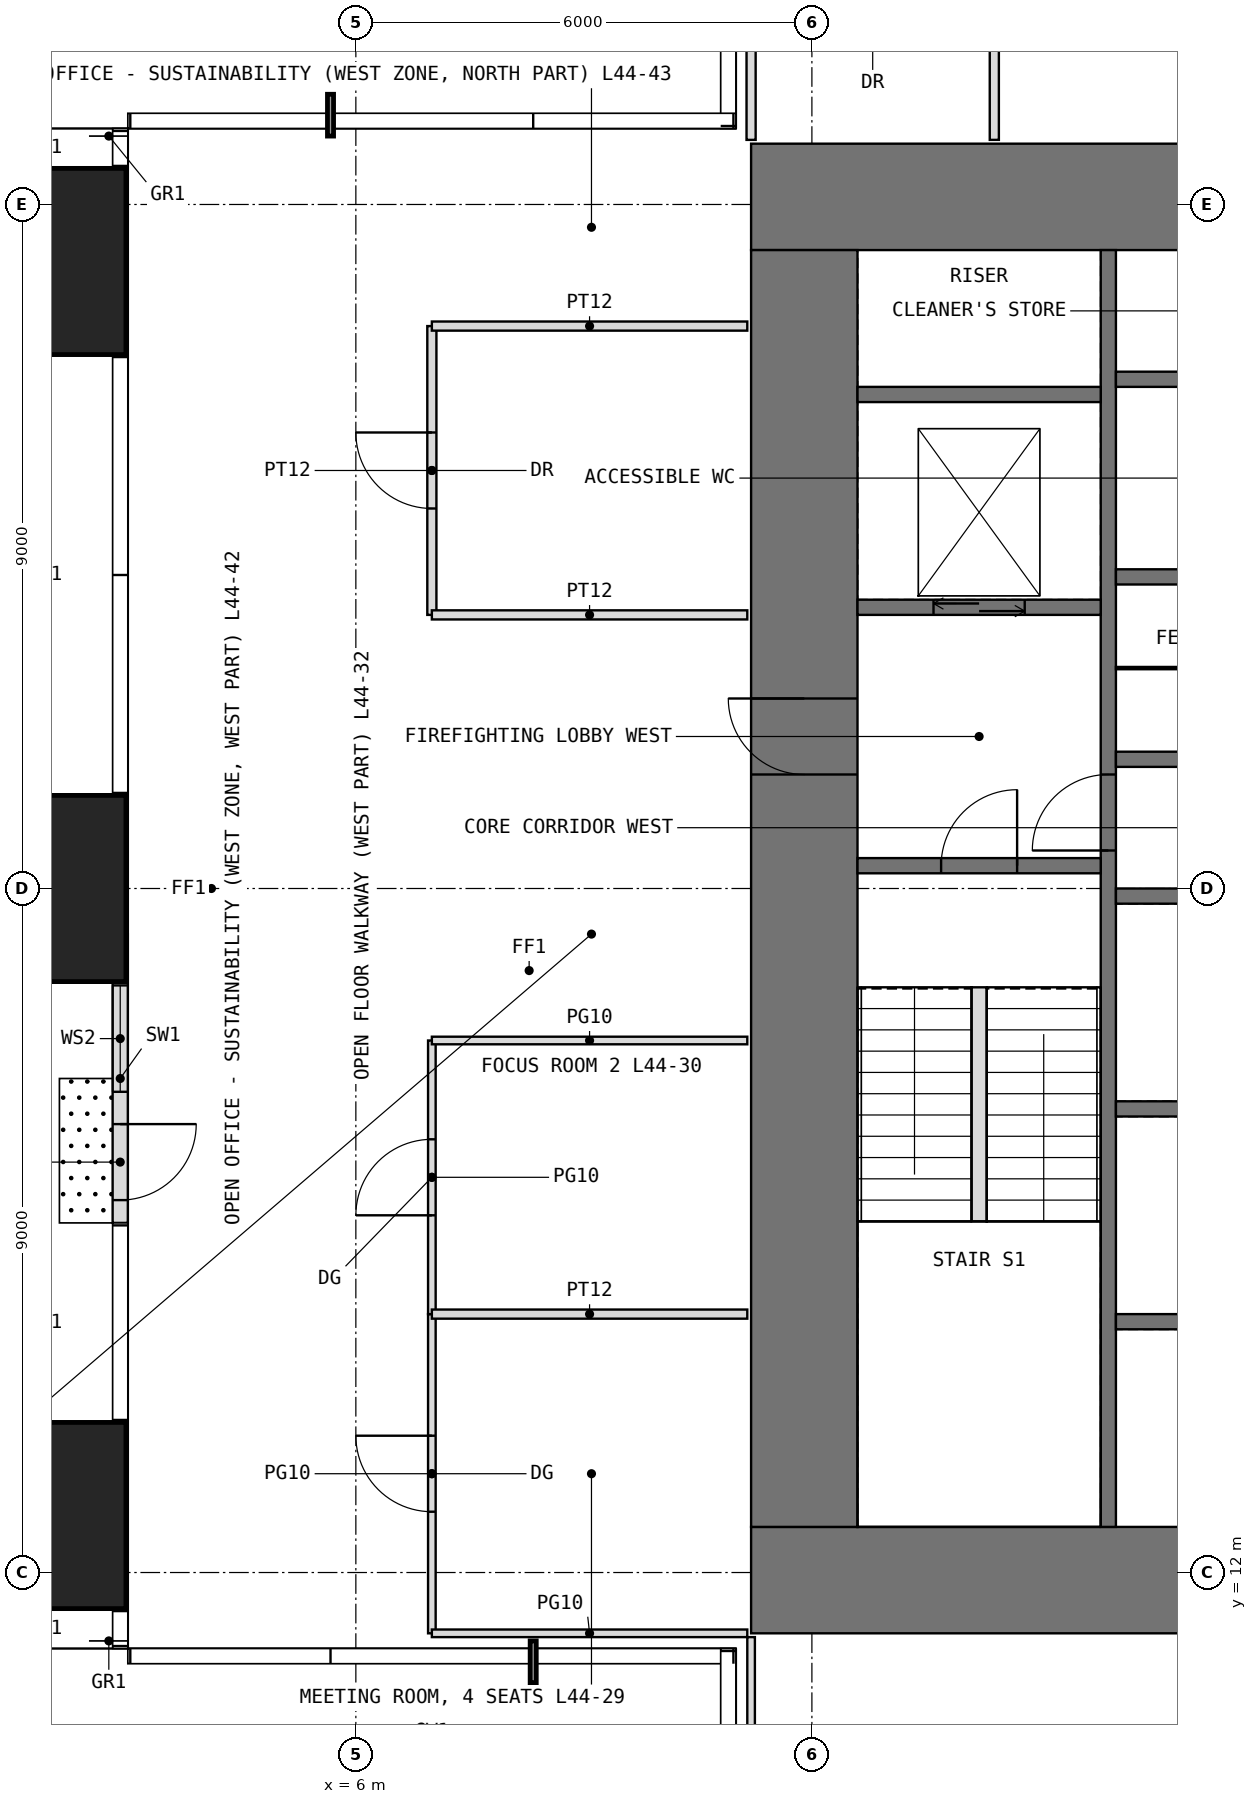
"""IFC4 building model, lengths in metres.
Left out: names, types, materials, properties, quantities, classifications, styles, units other than length and angle.
Written with IfcOpenShell. Run it as: python <this file> out.ifc"""

import sys

from ifc_helpers import new_model, si_unit, direction, frame, frame_2d, origin, origin_2d, place, context, subcontext, project, spatial, rectangle, extrude, element, fill, save


model = new_model("IFC4")
c1 = context("Model", 3, precision=1e-05, world=origin(), true_north=direction((0.0, 1.0)))
c2 = subcontext(c1, "Body", "Model", "MODEL_VIEW")
j1 = project(units=[si_unit("LENGTHUNIT", "METRE"), si_unit("PLANEANGLEUNIT", "RADIAN")], contexts=[c1])
p1 = place(None, origin())
s1 = spatial("IfcSite", under=j1, at=p1, CompositionType="ELEMENT")
p2 = place(p1, origin())
s2 = spatial("IfcBuilding", under=s1, at=p2, CompositionType="ELEMENT")
p3 = place(p2, frame((0.0, 0.0, 186.5)))
s3 = spatial("IfcBuildingStorey", under=s2, at=p3, CompositionType="ELEMENT", Elevation=186.5)
for number, where, z_axis, x_axis in (
    (1, (1.75, 12.75, 0.0), (0.0, 0.0, 1.0), (1.0, 0.0, 0.0)),
    (2, (1.75, 21.0, 0.0), (0.0, 0.0, 1.0), (1.0, 0.0, 0.0)),
    (3, (1.75, 29.25, 0.0), (0.0, 0.0, 1.0), (1.0, 0.0, 0.0)),
):
    element("IfcColumn", number, at=place(p3, frame(where, z_axis=z_axis, x_axis=x_axis)), inside=s3, PredefinedType="COLUMN", context=c2, shape_type="SweptSolid", body=[
        extrude(rectangle(XDim=2.45, YDim=2.45, at=origin_2d()), origin(), (0.0, 0.0, 1.0), 4.0),
    ])
p4 = place(p3, frame((2.9, 20.4, 0.0), z_axis=(0.0, 0.0, 1.0), x_axis=(0.0, -1.0, 0.0)))
e4 = element("IfcWall", 4, at=p4, inside=s3, PredefinedType="USERDEFINED", context=c2, shape_type="SweptSolid", body=[
    extrude(rectangle(XDim=3.8, YDim=0.2, at=frame_2d((1.9, 0.0))), origin(), (0.0, 0.0, 1.0), 3.75),
])
p5 = place(p4, frame((2.5, 0.0, 0.0)))
e5 = element("IfcOpeningElement", 5, at=p5, cuts=e4, PredefinedType="OPENING", context=c2, shape_type="SweptSolid", body=[
    extrude(rectangle(XDim=1.0, YDim=2.4, at=frame_2d((0.5, 1.2))), frame((0.0, 0.11, 0.0), z_axis=(0.0, -1.0, 0.0), x_axis=(1.0, 0.0, 0.0)), (0.0, 0.0, 1.0), 0.22),
])
p6 = place(p4, frame((0.675, 0.0, 0.3)))
e6 = element("IfcOpeningElement", 6, at=p6, cuts=e4, PredefinedType="OPENING", context=c2, shape_type="SweptSolid", body=[
    extrude(rectangle(XDim=1.4, YDim=2.7, at=frame_2d((0.7, 1.35))), frame((0.0, 0.11, 0.0), z_axis=(0.0, -1.0, 0.0), x_axis=(1.0, 0.0, 0.0)), (0.0, 0.0, 1.0), 0.22),
])
p7 = place(p3, frame((11.2, 11.9, -0.05), z_axis=(0.0, 0.0, 1.0), x_axis=(1.0, 0.0, 0.0)))
e7 = element("IfcWall", 7, at=p7, inside=s3, PredefinedType="SHEAR", context=c2, shape_type="SweptSolid", body=[
    extrude(rectangle(XDim=19.6, YDim=1.4, at=frame_2d((9.8, 0.0))), origin(), (0.0, 0.0, 1.0), 4.0),
])
p8 = place(p7, frame((8.8, 0.0, 0.05)))
e8 = element("IfcOpeningElement", 8, at=p8, cuts=e7, PredefinedType="OPENING", context=c2, shape_type="SweptSolid", body=[
    extrude(rectangle(XDim=2.0, YDim=2.2, at=frame_2d((1.0, 1.1))), frame((0.0, 0.71, 0.0), z_axis=(0.0, -1.0, 0.0), x_axis=(1.0, 0.0, 0.0)), (0.0, 0.0, 1.0), 1.42),
])
p9 = place(p3, frame((11.2, 30.1, -0.05), z_axis=(0.0, 0.0, 1.0), x_axis=(1.0, 0.0, 0.0)))
e9 = element("IfcWall", 9, at=p9, inside=s3, PredefinedType="SHEAR", context=c2, shape_type="SweptSolid", body=[
    extrude(rectangle(XDim=19.6, YDim=1.4, at=frame_2d((9.8, 0.0))), origin(), (0.0, 0.0, 1.0), 4.0),
])
p10 = place(p9, frame((8.8, 0.0, 0.05)))
e10 = element("IfcOpeningElement", 10, at=p10, cuts=e9, PredefinedType="OPENING", context=c2, shape_type="SweptSolid", body=[
    extrude(rectangle(XDim=2.0, YDim=2.2, at=frame_2d((1.0, 1.1))), frame((0.0, 0.71, 0.0), z_axis=(0.0, -1.0, 0.0), x_axis=(1.0, 0.0, 0.0)), (0.0, 0.0, 1.0), 1.42),
])
p11 = place(p3, frame((11.9, 12.6, -0.05), z_axis=(0.0, 0.0, 1.0), x_axis=(0.0, 1.0, 0.0)))
e11 = element("IfcWall", 11, at=p11, inside=s3, PredefinedType="SHEAR", context=c2, shape_type="SweptSolid", body=[
    extrude(rectangle(XDim=16.8, YDim=1.4, at=frame_2d((8.4, 0.0))), origin(), (0.0, 0.0, 1.0), 4.0),
])
p12 = place(p11, frame((9.9, 0.0, 0.05)))
e12 = element("IfcOpeningElement", 12, at=p12, cuts=e11, PredefinedType="OPENING", context=c2, shape_type="SweptSolid", body=[
    extrude(rectangle(XDim=1.0, YDim=2.2, at=frame_2d((0.5, 1.1))), frame((0.0, 0.71, 0.0), z_axis=(0.0, -1.0, 0.0), x_axis=(1.0, 0.0, 0.0)), (0.0, 0.0, 1.0), 1.42),
])
p13 = place(p3, frame((15.9, 12.6, -0.05), z_axis=(0.0, 0.0, 1.0), x_axis=(0.0, 1.0, 0.0)))
e13 = element("IfcWall", 13, at=p13, inside=s3, PredefinedType="SHEAR", context=c2, shape_type="SweptSolid", body=[
    extrude(rectangle(XDim=16.8, YDim=0.2, at=frame_2d((8.4, 0.0))), origin(), (0.0, 0.0, 1.0), 4.0),
])
p14 = place(p13, frame((8.9, 0.0, 0.05)))
e14 = element("IfcOpeningElement", 14, at=p14, cuts=e13, PredefinedType="OPENING", context=c2, shape_type="SweptSolid", body=[
    extrude(rectangle(XDim=1.0, YDim=2.2, at=frame_2d((0.5, 1.1))), frame((0.0, 0.11, 0.0), z_axis=(0.0, -1.0, 0.0), x_axis=(1.0, 0.0, 0.0)), (0.0, 0.0, 1.0), 0.22),
])
p15 = place(p3, frame((12.6, 21.3, -0.05), z_axis=(0.0, 0.0, 1.0), x_axis=(1.0, 0.0, 0.0)))
e15 = element("IfcWall", 15, at=p15, inside=s3, PredefinedType="SHEAR", context=c2, shape_type="SweptSolid", body=[
    extrude(rectangle(XDim=3.2, YDim=0.2, at=frame_2d((1.6, 0.0))), origin(), (0.0, 0.0, 1.0), 4.0),
])
p16 = place(p15, frame((1.1, 0.0, 0.05)))
e16 = element("IfcOpeningElement", 16, at=p16, cuts=e15, PredefinedType="OPENING", context=c2, shape_type="SweptSolid", body=[
    extrude(rectangle(XDim=1.0, YDim=2.2, at=frame_2d((0.5, 1.1))), frame((0.0, 0.11, 0.0), z_axis=(0.0, -1.0, 0.0), x_axis=(1.0, 0.0, 0.0)), (0.0, 0.0, 1.0), 0.22),
])
p17 = place(p3, frame((12.6, 24.7, -0.05), z_axis=(0.0, 0.0, 1.0), x_axis=(1.0, 0.0, 0.0)))
e17 = element("IfcWall", 17, at=p17, inside=s3, PredefinedType="SHEAR", context=c2, shape_type="SweptSolid", body=[
    extrude(rectangle(XDim=3.2, YDim=0.2, at=frame_2d((1.6, 0.0))), origin(), (0.0, 0.0, 1.0), 4.0),
])
p18 = place(p17, frame((1.0, 0.0, 0.05)))
e18 = element("IfcOpeningElement", 18, at=p18, cuts=e17, PredefinedType="OPENING", context=c2, shape_type="SweptSolid", body=[
    extrude(rectangle(XDim=1.2, YDim=2.2, at=frame_2d((0.6, 1.1))), frame((0.0, 0.11, 0.0), z_axis=(0.0, -1.0, 0.0), x_axis=(1.0, 0.0, 0.0)), (0.0, 0.0, 1.0), 0.22),
])
for number, where, z_axis, x_axis in (
    (19, (12.6, 27.5, -0.05), (0.0, 0.0, 1.0), (1.0, 0.0, 0.0)),
    (20, (16.0, 15.3, -0.05), (0.0, 0.0, 1.0), (1.0, 0.0, 0.0)),
    (21, (16.0, 18.1, -0.05), (0.0, 0.0, 1.0), (1.0, 0.0, 0.0)),
    (22, (16.0, 20.9, -0.05), (0.0, 0.0, 1.0), (1.0, 0.0, 0.0)),
    (23, (16.0, 22.7, -0.05), (0.0, 0.0, 1.0), (1.0, 0.0, 0.0)),
    (24, (16.0, 25.1, -0.05), (0.0, 0.0, 1.0), (1.0, 0.0, 0.0)),
    (25, (16.0, 27.7, -0.05), (0.0, 0.0, 1.0), (1.0, 0.0, 0.0)),
):
    element("IfcWall", number, at=place(p3, frame(where, z_axis=z_axis, x_axis=x_axis)), inside=s3, PredefinedType="SHEAR", context=c2, shape_type="SweptSolid", body=[
        extrude(rectangle(XDim=3.2, YDim=0.2, at=frame_2d((1.6, 0.0))), origin(), (0.0, 0.0, 1.0), 4.0),
    ])
p19 = place(p3, frame((16.0, 23.9, 0.0), z_axis=(0.0, 0.0, 1.0), x_axis=(1.0, 0.0, 0.0)))
e26 = element("IfcWall", 26, at=p19, inside=s3, PredefinedType="PARTITIONING", context=c2, shape_type="SweptSolid", body=[
    extrude(rectangle(XDim=1.4, YDim=0.03, at=frame_2d((0.7, 0.0))), origin(), (0.0, 0.0, 1.0), 3.75),
])
p20 = place(p3, frame((7.0, 11.2, 0.0), z_axis=(0.0, 0.0, 1.0), x_axis=(0.0, 1.0, 0.0)))
e27 = element("IfcWall", 27, at=p20, inside=s3, PredefinedType="PARTITIONING", context=c2, shape_type="SweptSolid", body=[
    extrude(rectangle(XDim=4.2, YDim=0.1, at=frame_2d((2.1, 0.0))), origin(), (0.0, 0.0, 1.0), 3.75),
])
p21 = place(p20, frame((1.6, 0.0, 0.0)))
e28 = element("IfcOpeningElement", 28, at=p21, cuts=e27, PredefinedType="OPENING", context=c2, shape_type="SweptSolid", body=[
    extrude(rectangle(XDim=1.0, YDim=2.4, at=frame_2d((0.5, 1.2))), frame((0.0, 0.06, 0.0), z_axis=(0.0, -1.0, 0.0), x_axis=(1.0, 0.0, 0.0)), (0.0, 0.0, 1.0), 0.12),
])
p22 = place(p3, frame((7.0, 11.2, 0.0), z_axis=(0.0, 0.0, 1.0), x_axis=(1.0, 0.0, 0.0)))
e29 = element("IfcWall", 29, at=p22, inside=s3, PredefinedType="PARTITIONING", context=c2, shape_type="SweptSolid", body=[
    extrude(rectangle(XDim=4.15, YDim=0.1, at=frame_2d((2.075, 0.0))), origin(), (0.0, 0.0, 1.0), 3.75),
])
p23 = place(p3, frame((7.0, 15.4, 0.0), z_axis=(0.0, 0.0, 1.0), x_axis=(0.0, 1.0, 0.0)))
e30 = element("IfcWall", 30, at=p23, inside=s3, PredefinedType="PARTITIONING", context=c2, shape_type="SweptSolid", body=[
    extrude(rectangle(XDim=3.6, YDim=0.1, at=frame_2d((1.8, 0.0))), origin(), (0.0, 0.0, 1.0), 3.75),
])
p24 = place(p23, frame((1.3, 0.0, 0.0)))
e31 = element("IfcOpeningElement", 31, at=p24, cuts=e30, PredefinedType="OPENING", context=c2, shape_type="SweptSolid", body=[
    extrude(rectangle(XDim=1.0, YDim=2.4, at=frame_2d((0.5, 1.2))), frame((0.0, 0.06, 0.0), z_axis=(0.0, -1.0, 0.0), x_axis=(1.0, 0.0, 0.0)), (0.0, 0.0, 1.0), 0.12),
])
p25 = place(p3, frame((7.0, 15.4, 0.0), z_axis=(0.0, 0.0, 1.0), x_axis=(1.0, 0.0, 0.0)))
e32 = element("IfcWall", 32, at=p25, inside=s3, PredefinedType="PARTITIONING", context=c2, shape_type="SweptSolid", body=[
    extrude(rectangle(XDim=4.15, YDim=0.12, at=frame_2d((2.075, 0.0))), origin(), (0.0, 0.0, 1.0), 3.75),
])
p26 = place(p3, frame((7.0, 19.0, 0.0), z_axis=(0.0, 0.0, 1.0), x_axis=(1.0, 0.0, 0.0)))
e33 = element("IfcWall", 33, at=p26, inside=s3, PredefinedType="PARTITIONING", context=c2, shape_type="SweptSolid", body=[
    extrude(rectangle(XDim=4.15, YDim=0.1, at=frame_2d((2.075, 0.0))), origin(), (0.0, 0.0, 1.0), 3.75),
])
p27 = place(p3, frame((7.0, 24.6, 0.0), z_axis=(0.0, 0.0, 1.0), x_axis=(0.0, 1.0, 0.0)))
e34 = element("IfcWall", 34, at=p27, inside=s3, PredefinedType="PARTITIONING", context=c2, shape_type="SweptSolid", body=[
    extrude(rectangle(XDim=3.8, YDim=0.12, at=frame_2d((1.9, 0.0))), origin(), (0.0, 0.0, 1.0), 3.75),
])
p28 = place(p27, frame((1.4, 0.0, 0.0)))
e35 = element("IfcOpeningElement", 35, at=p28, cuts=e34, PredefinedType="OPENING", context=c2, shape_type="SweptSolid", body=[
    extrude(rectangle(XDim=1.0, YDim=2.2, at=frame_2d((0.5, 1.1))), frame((0.0, 0.07, 0.0), z_axis=(0.0, -1.0, 0.0), x_axis=(1.0, 0.0, 0.0)), (0.0, 0.0, 1.0), 0.14),
])
for number, where, z_axis, x_axis in (
    (36, (7.0, 24.6, 0.0), (0.0, 0.0, 1.0), (1.0, 0.0, 0.0)),
    (37, (7.0, 28.4, 0.0), (0.0, 0.0, 1.0), (1.0, 0.0, 0.0)),
):
    element("IfcWall", number, at=place(p3, frame(where, z_axis=z_axis, x_axis=x_axis)), inside=s3, PredefinedType="PARTITIONING", context=c2, shape_type="SweptSolid", body=[
        extrude(rectangle(XDim=4.15, YDim=0.12, at=frame_2d((2.075, 0.0))), origin(), (0.0, 0.0, 1.0), 3.75),
    ])
p29 = place(p3, frame((11.2, 6.2, 0.0), z_axis=(0.0, 0.0, 1.0), x_axis=(0.0, 1.0, 0.0)))
e38 = element("IfcWall", 38, at=p29, inside=s3, PredefinedType="PARTITIONING", context=c2, shape_type="SweptSolid", body=[
    extrude(rectangle(XDim=4.95, YDim=0.1, at=frame_2d((2.475, 0.0))), origin(), (0.0, 0.0, 1.0), 3.75),
])
for number, where, z_axis, x_axis in (
    (39, (11.2, 30.85, 0.0), (0.0, 0.0, 1.0), (0.0, 1.0, 0.0)),
    (40, (14.4, 30.85, 0.0), (0.0, 0.0, 1.0), (0.0, 1.0, 0.0)),
):
    element("IfcWall", number, at=place(p3, frame(where, z_axis=z_axis, x_axis=x_axis)), inside=s3, PredefinedType="PARTITIONING", context=c2, shape_type="SweptSolid", body=[
        extrude(rectangle(XDim=2.65, YDim=0.12, at=frame_2d((1.325, 0.0))), origin(), (0.0, 0.0, 1.0), 3.75),
    ])
p30 = place(p3, frame((14.2, 16.62, 0.0), z_axis=(0.0, 0.0, 1.0), x_axis=(0.0, 1.0, 0.0)))
e41 = element("IfcWall", 41, at=p30, inside=s3, PredefinedType="PARTITIONING", context=c2, shape_type="SweptSolid", body=[
    extrude(rectangle(XDim=3.08, YDim=0.2, at=frame_2d((1.54, 0.0))), origin(), (0.0, 0.0, 1.0), 4.0),
])
p31 = place(p5, origin())
e42 = element("IfcDoor", 42, at=p31, inside=s3, OperationType="SINGLE_SWING_LEFT", PredefinedType="DOOR", context=c2, shape_type="SweptSolid", body=[
    extrude(rectangle(XDim=1.0, YDim=2.4, at=frame_2d((0.5, 1.2))), frame((0.0, 0.025, 0.0), z_axis=(0.0, -1.0, 0.0), x_axis=(1.0, 0.0, 0.0)), (0.0, 0.0, 1.0), 0.05),
])
fill(e5, e42)
p32 = place(p6, origin())
e43 = element("IfcWindow", 43, at=p32, inside=s3, PartitioningType="SINGLE_PANEL", PredefinedType="WINDOW", context=c2, shape_type="SweptSolid", body=[
    extrude(rectangle(XDim=1.4, YDim=2.7, at=frame_2d((0.7, 1.35))), frame((0.0, 0.03, 0.0), z_axis=(0.0, -1.0, 0.0), x_axis=(1.0, 0.0, 0.0)), (0.0, 0.0, 1.0), 0.06),
])
fill(e6, e43)
p33 = place(p12, origin())
e44 = element("IfcDoor", 44, at=p33, inside=s3, OperationType="SINGLE_SWING_RIGHT", PredefinedType="DOOR", context=c2, shape_type="SweptSolid", body=[
    extrude(rectangle(XDim=1.0, YDim=2.2, at=frame_2d((0.5, 1.1))), frame((0.0, 0.025, 0.0), z_axis=(0.0, -1.0, 0.0), x_axis=(1.0, 0.0, 0.0)), (0.0, 0.0, 1.0), 0.05),
])
fill(e12, e44)
p34 = place(p16, origin())
e45 = element("IfcDoor", 45, at=p34, inside=s3, OperationType="SINGLE_SWING_RIGHT", PredefinedType="DOOR", context=c2, shape_type="SweptSolid", body=[
    extrude(rectangle(XDim=1.0, YDim=2.2, at=frame_2d((0.5, 1.1))), frame((0.0, 0.025, 0.0), z_axis=(0.0, -1.0, 0.0), x_axis=(1.0, 0.0, 0.0)), (0.0, 0.0, 1.0), 0.05),
])
fill(e16, e45)
p35 = place(p14, origin())
e46 = element("IfcDoor", 46, at=p35, inside=s3, OperationType="SINGLE_SWING_LEFT", PredefinedType="DOOR", context=c2, shape_type="SweptSolid", body=[
    extrude(rectangle(XDim=1.0, YDim=2.2, at=frame_2d((0.5, 1.1))), frame((0.0, 0.025, 0.0), z_axis=(0.0, -1.0, 0.0), x_axis=(1.0, 0.0, 0.0)), (0.0, 0.0, 1.0), 0.05),
])
fill(e14, e46)
p36 = place(p21, origin())
e47 = element("IfcDoor", 47, at=p36, inside=s3, OperationType="SINGLE_SWING_RIGHT", PredefinedType="DOOR", context=c2, shape_type="SweptSolid", body=[
    extrude(rectangle(XDim=1.0, YDim=2.4, at=frame_2d((0.5, 1.2))), frame((0.0, 0.025, 0.0), z_axis=(0.0, -1.0, 0.0), x_axis=(1.0, 0.0, 0.0)), (0.0, 0.0, 1.0), 0.05),
])
fill(e28, e47)
p37 = place(p24, origin())
e48 = element("IfcDoor", 48, at=p37, inside=s3, OperationType="SINGLE_SWING_LEFT", PredefinedType="DOOR", context=c2, shape_type="SweptSolid", body=[
    extrude(rectangle(XDim=1.0, YDim=2.4, at=frame_2d((0.5, 1.2))), frame((0.0, 0.025, 0.0), z_axis=(0.0, -1.0, 0.0), x_axis=(1.0, 0.0, 0.0)), (0.0, 0.0, 1.0), 0.05),
])
fill(e31, e48)
p38 = place(p28, origin())
e49 = element("IfcDoor", 49, at=p38, inside=s3, OperationType="SINGLE_SWING_RIGHT", PredefinedType="DOOR", context=c2, shape_type="SweptSolid", body=[
    extrude(rectangle(XDim=1.0, YDim=2.2, at=frame_2d((0.5, 1.1))), frame((0.0, 0.025, 0.0), z_axis=(0.0, -1.0, 0.0), x_axis=(1.0, 0.0, 0.0)), (0.0, 0.0, 1.0), 0.05),
])
fill(e35, e49)
p39 = place(p18, origin())
e50 = element("IfcDoor", 50, at=p39, inside=s3, OperationType="DOUBLE_DOOR_SLIDING", PredefinedType="DOOR", context=c2, shape_type="SweptSolid", body=[
    extrude(rectangle(XDim=1.2, YDim=2.2, at=frame_2d((0.6, 1.1))), frame((0.0, 0.025, 0.0), z_axis=(0.0, -1.0, 0.0), x_axis=(1.0, 0.0, 0.0)), (0.0, 0.0, 1.0), 0.05),
])
fill(e18, e50)
save(model, sys.argv[1])
